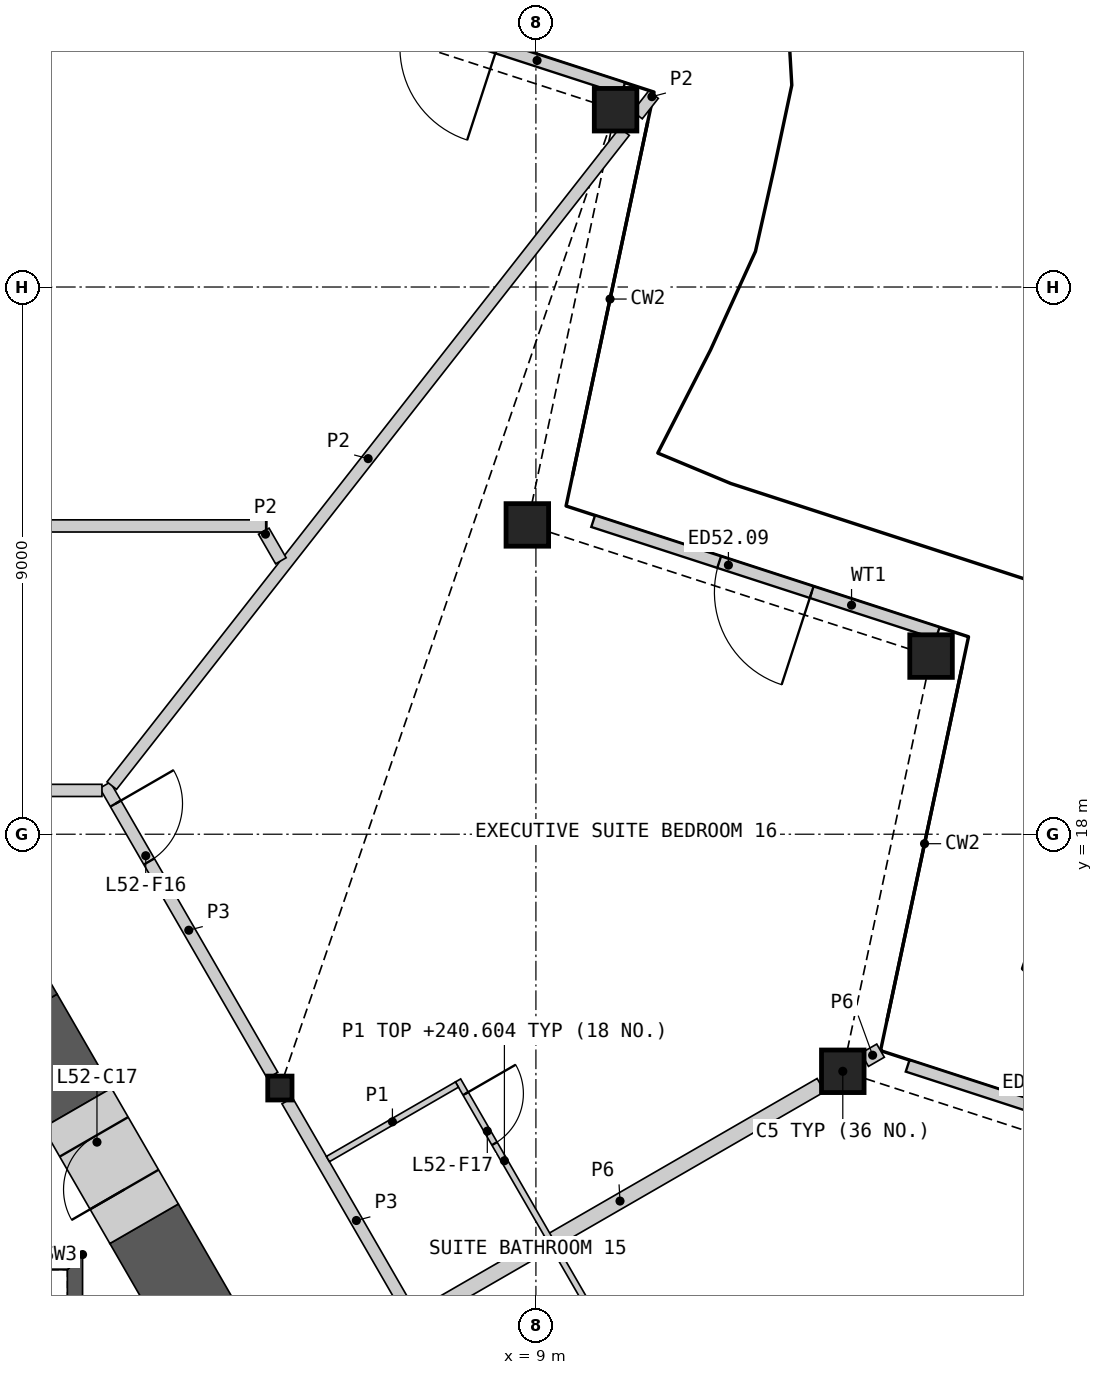
"""IFC4 building model, lengths in metres.
Left out: names, types, materials, properties, quantities, classifications, styles, units other than length and angle.
Written with IfcOpenShell. Run it as: python <this file> out.ifc"""

import sys

from ifc_helpers import new_model, si_unit, direction, frame, frame_2d, origin, origin_2d, place, context, subcontext, project, spatial, polyline, rectangle, hollow_rectangle, i_section, outline, extrude, element, fill, save


model = new_model("IFC4")
c1 = context("Model", 3, precision=1e-05, world=origin(), true_north=direction((0.0, 1.0)))
c2 = subcontext(c1, "Body", "Model", "MODEL_VIEW")
j1 = project(units=[si_unit("LENGTHUNIT", "METRE"), si_unit("PLANEANGLEUNIT", "RADIAN")], contexts=[c1])
p1 = place(None, origin())
s1 = spatial("IfcSite", under=j1, at=p1, CompositionType="ELEMENT")
p2 = place(p1, origin())
s2 = spatial("IfcBuilding", under=s1, at=p2, CompositionType="ELEMENT")
p3 = place(p2, frame((0.0, 0.0, 238.2)))
s3 = spatial("IfcBuildingStorey", under=s2, at=p3, CompositionType="ELEMENT", Elevation=238.2)
for number, where, z_axis, x_axis in (
    (1, (14.047, 14.101, 0.0), (0.0, 0.0, 1.0), (1.0, 0.0, 0.0)),
    (2, (15.499, 20.93, 0.0), (0.0, 0.0, 1.0), (1.0, 0.0, 0.0)),
    (3, (8.859, 23.087, 0.0), (0.0, 0.0, 1.0), (1.0, 0.0, 0.0)),
    (4, (10.31, 29.916, 0.0), (0.0, 0.0, 1.0), (1.0, 0.0, 0.0)),
):
    element("IfcColumn", number, at=place(p3, frame(where, z_axis=z_axis, x_axis=x_axis)), inside=s3, PredefinedType="COLUMN", context=c2, shape_type="SweptSolid", body=[
        extrude(hollow_rectangle(XDim=0.7, YDim=0.7, WallThickness=0.045, at=origin_2d()), origin(), (0.0, 0.0, 1.0), 3.6),
    ])
p4 = place(p3, frame((4.789, 13.825, 0.0), z_axis=(0.0, 0.0, 1.0), x_axis=(1.0, 0.0, 0.0)))
e5 = element("IfcColumn", 5, at=p4, inside=s3, PredefinedType="COLUMN", context=c2, shape_type="SweptSolid", body=[
    extrude(i_section(OverallWidth=0.399, OverallDepth=0.393, WebThickness=0.023, FlangeThickness=0.037, at=origin_2d()), origin(), (0.0, 0.0, 1.0), 3.6),
])
p5 = place(p3, frame((20.779, 12.35, 0.0), z_axis=(0.0, 0.0, 1.0), x_axis=(-0.951065383831, 0.308989701572, 0.0)))
e6 = element("IfcWall", 6, at=p5, inside=s3, PredefinedType="SOLIDWALL", context=c2, shape_type="SweptSolid", body=[
    extrude(rectangle(XDim=5.958, YDim=0.2, at=frame_2d((2.979, 0.0))), origin(), (0.0, 0.0, 1.0), 2.701),
])
p6 = place(p5, frame((2.179, 0.0, 0.0)))
e7 = element("IfcOpeningElement", 7, at=p6, cuts=e6, PredefinedType="OPENING", context=c2, shape_type="SweptSolid", body=[
    extrude(rectangle(XDim=1.6, YDim=2.4, at=frame_2d((0.8, 1.2))), frame((0.0, 0.11, 0.0), z_axis=(0.0, -1.0, 0.0), x_axis=(1.0, 0.0, 0.0)), (0.0, 0.0, 1.0), 0.22),
])
p7 = place(p3, frame((15.607, 21.308, 0.0), z_axis=(0.0, 0.0, 1.0), x_axis=(-0.951065383831, 0.308989701572, 0.0)))
e8 = element("IfcWall", 8, at=p7, inside=s3, PredefinedType="SOLIDWALL", context=c2, shape_type="SweptSolid", body=[
    extrude(rectangle(XDim=5.958, YDim=0.2, at=frame_2d((2.979, 0.0))), origin(), (0.0, 0.0, 1.0), 2.701),
])
p8 = place(p7, frame((2.179, 0.0, 0.0)))
e9 = element("IfcOpeningElement", 9, at=p8, cuts=e8, PredefinedType="OPENING", context=c2, shape_type="SweptSolid", body=[
    extrude(rectangle(XDim=1.6, YDim=2.4, at=frame_2d((0.8, 1.2))), frame((0.0, 0.11, 0.0), z_axis=(0.0, -1.0, 0.0), x_axis=(1.0, 0.0, 0.0)), (0.0, 0.0, 1.0), 0.22),
])
p9 = place(p3, frame((10.435, 30.266, 0.0), z_axis=(0.0, 0.0, 1.0), x_axis=(-0.951061471046, 0.309001744805, 0.0)))
e10 = element("IfcWall", 10, at=p9, inside=s3, PredefinedType="SOLIDWALL", context=c2, shape_type="SweptSolid", body=[
    extrude(rectangle(XDim=5.957, YDim=0.2, at=frame_2d((2.979, 0.0))), origin(), (0.0, 0.0, 1.0), 2.701),
])
p10 = place(p9, frame((2.179, 0.0, 0.0)))
e11 = element("IfcOpeningElement", 11, at=p10, cuts=e10, PredefinedType="OPENING", context=c2, shape_type="SweptSolid", body=[
    extrude(rectangle(XDim=1.6, YDim=2.4, at=frame_2d((0.8, 1.2))), frame((0.0, 0.11, 0.0), z_axis=(0.0, -1.0, 0.0), x_axis=(1.0, 0.0, 0.0)), (0.0, 0.0, 1.0), 0.22),
])
p11 = place(p3, origin())
e12 = element("IfcWall", 12, at=p11, inside=s3, PredefinedType="SHEAR", context=c2, shape_type="SweptSolid", body=[
    extrude(outline(polyline([(1.544, 5.237), (1.544, 11.087), (1.294, 10.837), (1.294, 5.237), (1.544, 5.237)])), origin(), (0.0, 0.0, 1.0), 3.25),
])
p12 = place(p3, origin())
e13 = element("IfcWall", 13, at=p12, inside=s3, PredefinedType="SHEAR", context=c2, shape_type="SweptSolid", body=[
    extrude(outline(polyline([(1.544, 11.087), (-1.544, 11.087), (-1.294, 10.837), (1.294, 10.837), (1.544, 11.087)])), origin(), (0.0, 0.0, 1.0), 3.25),
])
p13 = place(p3, frame((10.081, -1.441, 0.0), z_axis=(0.0, 0.0, 1.0), x_axis=(-0.500012180433, 0.866018371294, 0.0)))
e14 = element("IfcWall", 14, at=p13, inside=s3, PredefinedType="SHEAR", context=c2, shape_type="SweptSolid", body=[
    extrude(rectangle(XDim=15.05, YDim=1.3, at=frame_2d((7.525, 0.0))), origin(), (0.0, 0.0, 1.0), 3.25),
])
p14 = place(p3, frame((1.456, 13.499, 0.0), z_axis=(0.0, 0.0, 1.0), x_axis=(-0.499990639951, 0.866030807744, 0.0)))
e15 = element("IfcWall", 15, at=p14, inside=s3, PredefinedType="SHEAR", context=c2, shape_type="SweptSolid", body=[
    extrude(rectangle(XDim=1.786, YDim=1.3, at=frame_2d((0.893, 0.0))), origin(), (0.0, 0.0, 1.0), 3.25),
])
p15 = place(p3, origin())
e16 = element("IfcWall", 16, at=p15, inside=s3, PredefinedType="SHEAR", context=c2, shape_type="SweptSolid", body=[
    extrude(outline(polyline([(-1.126, 15.371), (0.0, 17.321), (1.126, 15.371), (0.0, 14.72), (-1.126, 15.371)])), origin(), (0.0, 0.0, 1.0), 3.25),
])
p16 = place(p3, frame((2.556, 11.593, 0.0), z_axis=(0.0, 0.0, 1.0), x_axis=(-0.499946605688, 0.86605622881, 0.0)))
e17 = element("IfcWall", 17, at=p16, inside=s3, PredefinedType="SHEAR", context=c2, shape_type="SweptSolid", body=[
    extrude(rectangle(XDim=2.2, YDim=1.3, at=frame_2d((1.1, 0.0))), origin(), (0.0, 0.0, 1.0), 3.25),
])
p17 = place(p16, frame((0.65, 0.0, 0.0)))
e18 = element("IfcOpeningElement", 18, at=p17, cuts=e17, PredefinedType="OPENING", context=c2, shape_type="SweptSolid", body=[
    extrude(rectangle(XDim=1.0, YDim=2.1, at=frame_2d((0.5, 1.05))), frame((0.0, 0.66, 0.0), z_axis=(0.0, -1.0, 0.0), x_axis=(1.0, 0.0, 0.0)), (0.0, 0.0, 1.0), 1.32),
])
p18 = place(p3, frame((4.91, 13.616, 0.0), z_axis=(0.0, 0.0, 1.0), x_axis=(0.50000207303, -0.866024206917, 0.0)))
e19 = element("IfcWall", 19, at=p18, inside=s3, PredefinedType="PARTITIONING", context=c2, shape_type="SweptSolid", body=[
    extrude(rectangle(XDim=9.095, YDim=0.2, at=frame_2d((4.547, 0.0))), origin(), (0.0, 0.0, 1.0), 3.25),
])
p19 = place(p3, frame((7.079, 10.059, 0.0), z_axis=(0.0, 0.0, 1.0), x_axis=(0.866033195618, 0.499986503906, 0.0)))
e20 = element("IfcWall", 20, at=p19, inside=s3, PredefinedType="PARTITIONING", context=c2, shape_type="SweptSolid", body=[
    extrude(rectangle(XDim=7.63, YDim=0.25, at=frame_2d((3.815, 0.0))), origin(), (0.0, 0.0, 1.0), 2.404),
])
p20 = place(p3, frame((1.913, 18.807, 0.0), z_axis=(0.0, 0.0, 1.0), x_axis=(0.499984524817, -0.866034338201, 0.0)))
e21 = element("IfcWall", 21, at=p20, inside=s3, PredefinedType="PARTITIONING", context=c2, shape_type="SweptSolid", body=[
    extrude(rectangle(XDim=5.51, YDim=0.2, at=frame_2d((2.755, 0.0))), origin(), (0.0, 0.0, 1.0), 3.25),
])
p21 = place(p20, frame((0.35, 0.0, 0.0)))
e22 = element("IfcOpeningElement", 22, at=p21, cuts=e21, PredefinedType="OPENING", context=c2, shape_type="SweptSolid", body=[
    extrude(rectangle(XDim=1.1, YDim=2.1, at=frame_2d((0.55, 1.05))), frame((0.0, 0.11, 0.0), z_axis=(0.0, -1.0, 0.0), x_axis=(1.0, 0.0, 0.0)), (0.0, 0.0, 1.0), 0.22),
])
p22 = place(p3, frame((-1.963, 18.72, 0.0), z_axis=(0.0, 0.0, 1.0), x_axis=(1.0, 0.0, 0.0)))
e23 = element("IfcWall", 23, at=p22, inside=s3, PredefinedType="PARTITIONING", context=c2, shape_type="SweptSolid", body=[
    extrude(rectangle(XDim=3.826, YDim=0.2, at=frame_2d((1.913, 0.0))), origin(), (0.0, 0.0, 1.0), 3.25),
])
p23 = place(p22, frame((1.49, 0.0, 0.0)))
e24 = element("IfcOpeningElement", 24, at=p23, cuts=e23, PredefinedType="OPENING", context=c2, shape_type="SweptSolid", body=[
    extrude(rectangle(XDim=0.95, YDim=2.1, at=frame_2d((0.475, 1.05))), frame((0.0, 0.11, 0.0), z_axis=(0.0, -1.0, 0.0), x_axis=(1.0, 0.0, 0.0)), (0.0, 0.0, 1.0), 0.22),
])
p24 = place(p3, frame((14.407, 14.29, 0.0), z_axis=(0.0, 0.0, 1.0), x_axis=(0.865888485494, 0.500237074485, 0.0)))
e25 = element("IfcWall", 25, at=p24, inside=s3, PredefinedType="PARTITIONING", context=c2, shape_type="SweptSolid", body=[
    extrude(rectangle(XDim=0.301, YDim=0.25, at=frame_2d((0.15, 0.0))), origin(), (0.0, 0.0, 1.0), 2.404),
])
p25 = place(p3, frame((2.025, 18.799, 0.0), z_axis=(0.0, 0.0, 1.0), x_axis=(0.616942368609, 0.787008331478, 0.0)))
e26 = element("IfcWall", 26, at=p25, inside=s3, PredefinedType="PARTITIONING", context=c2, shape_type="SweptSolid", body=[
    extrude(rectangle(XDim=13.668, YDim=0.2, at=frame_2d((6.834, 0.0))), origin(), (0.0, 0.0, 1.0), 2.404),
])
p26 = place(p3, frame((-7.428, 23.071, 0.0), z_axis=(0.0, 0.0, 1.0), x_axis=(1.0, 0.0, 0.0)))
e27 = element("IfcWall", 27, at=p26, inside=s3, PredefinedType="PARTITIONING", context=c2, shape_type="SweptSolid", body=[
    extrude(rectangle(XDim=12.002, YDim=0.2, at=frame_2d((6.001, 0.0))), origin(), (0.0, 0.0, 1.0), 2.404),
])
p27 = place(p26, frame((5.275, 0.0, 0.0)))
e28 = element("IfcOpeningElement", 28, at=p27, cuts=e27, PredefinedType="OPENING", context=c2, shape_type="SweptSolid", body=[
    extrude(rectangle(XDim=0.95, YDim=2.1, at=frame_2d((0.475, 1.05))), frame((0.0, 0.11, 0.0), z_axis=(0.0, -1.0, 0.0), x_axis=(1.0, 0.0, 0.0)), (0.0, 0.0, 1.0), 0.22),
])
p28 = place(p3, frame((4.524, 22.984, 0.0), z_axis=(0.0, 0.0, 1.0), x_axis=(0.500248658738, -0.865881792989, 0.0)))
e29 = element("IfcWall", 29, at=p28, inside=s3, PredefinedType="PARTITIONING", context=c2, shape_type="SweptSolid", body=[
    extrude(rectangle(XDim=0.562, YDim=0.2, at=frame_2d((0.281, 0.0))), origin(), (0.0, 0.0, 1.0), 2.404),
])
p29 = place(p3, frame((10.67, 29.828, 0.0), z_axis=(0.0, 0.0, 1.0), x_axis=(0.617216179113, 0.786793612227, 0.0)))
e30 = element("IfcWall", 30, at=p29, inside=s3, PredefinedType="PARTITIONING", context=c2, shape_type="SweptSolid", body=[
    extrude(rectangle(XDim=0.427, YDim=0.2, at=frame_2d((0.214, 0.0))), origin(), (0.0, 0.0, 1.0), 2.404),
])
p30 = place(p3, frame((7.719, 13.95, 0.0), z_axis=(0.0, 0.0, 1.0), x_axis=(0.500008851346, -0.866020293397, 0.0)))
e31 = element("IfcWall", 31, at=p30, inside=s3, PredefinedType="PARTITIONING", context=c2, shape_type="SweptSolid", body=[
    extrude(rectangle(XDim=6.1, YDim=0.1, at=frame_2d((3.05, 0.0))), origin(), (0.0, 0.0, 1.0), 2.404),
])
p31 = place(p30, frame((4.9, 0.0, 0.0)))
e32 = element("IfcOpeningElement", 32, at=p31, cuts=e31, PredefinedType="OPENING", context=c2, shape_type="SweptSolid", body=[
    extrude(rectangle(XDim=0.95, YDim=2.1, at=frame_2d((0.475, 1.05))), frame((0.0, 0.06, 0.0), z_axis=(0.0, -1.0, 0.0), x_axis=(1.0, 0.0, 0.0)), (0.0, 0.0, 1.0), 0.12),
])
p32 = place(p30, frame((0.25, 0.0, 0.0)))
e33 = element("IfcOpeningElement", 33, at=p32, cuts=e31, PredefinedType="OPENING", context=c2, shape_type="SweptSolid", body=[
    extrude(rectangle(XDim=0.95, YDim=2.1, at=frame_2d((0.475, 1.05))), frame((0.0, 0.06, 0.0), z_axis=(0.0, -1.0, 0.0), x_axis=(1.0, 0.0, 0.0)), (0.0, 0.0, 1.0), 0.12),
])
p33 = place(p3, frame((5.579, 12.657, 0.0), z_axis=(0.0, 0.0, 1.0), x_axis=(0.866057815567, 0.499943856944, 0.0)))
e34 = element("IfcWall", 34, at=p33, inside=s3, PredefinedType="PARTITIONING", context=c2, shape_type="SweptSolid", body=[
    extrude(rectangle(XDim=2.45, YDim=0.1, at=frame_2d((1.225, 0.0))), origin(), (0.0, 0.0, 1.0), 2.404),
])
p34 = place(p8, origin())
e35 = element("IfcDoor", 35, at=p34, inside=s3, OperationType="DOUBLE_DOOR_SINGLE_SWING", PredefinedType="DOOR", context=c2, shape_type="SweptSolid", body=[
    extrude(rectangle(XDim=1.6, YDim=2.4, at=frame_2d((0.8, 1.2))), frame((0.0, 0.025, 0.0), z_axis=(0.0, -1.0, 0.0), x_axis=(1.0, 0.0, 0.0)), (0.0, 0.0, 1.0), 0.05),
])
fill(e9, e35)
p35 = place(p17, origin())
e36 = element("IfcDoor", 36, at=p35, inside=s3, OperationType="SINGLE_SWING_LEFT", PredefinedType="DOOR", context=c2, shape_type="SweptSolid", body=[
    extrude(rectangle(XDim=1.0, YDim=2.1, at=frame_2d((0.5, 1.05))), frame((0.0, 0.405, 0.0), z_axis=(0.0, -1.0, 0.0), x_axis=(1.0, 0.0, 0.0)), (0.0, 0.0, 1.0), 0.05),
])
fill(e18, e36)
p36 = place(p21, origin())
e37 = element("IfcDoor", 37, at=p36, inside=s3, OperationType="SINGLE_SWING_LEFT", PredefinedType="DOOR", context=c2, shape_type="SweptSolid", body=[
    extrude(rectangle(XDim=1.1, YDim=2.1, at=frame_2d((0.55, 1.05))), frame((0.0, 0.025, 0.0), z_axis=(0.0, -1.0, 0.0), x_axis=(1.0, 0.0, 0.0)), (0.0, 0.0, 1.0), 0.05),
])
fill(e22, e37)
p37 = place(p32, origin())
e38 = element("IfcDoor", 38, at=p37, inside=s3, OperationType="SINGLE_SWING_LEFT", PredefinedType="DOOR", context=c2, shape_type="SweptSolid", body=[
    extrude(rectangle(XDim=0.95, YDim=2.1, at=frame_2d((0.475, 1.05))), frame((0.0, 0.025, 0.0), z_axis=(0.0, -1.0, 0.0), x_axis=(1.0, 0.0, 0.0)), (0.0, 0.0, 1.0), 0.05),
])
fill(e33, e38)
save(model, sys.argv[1])
